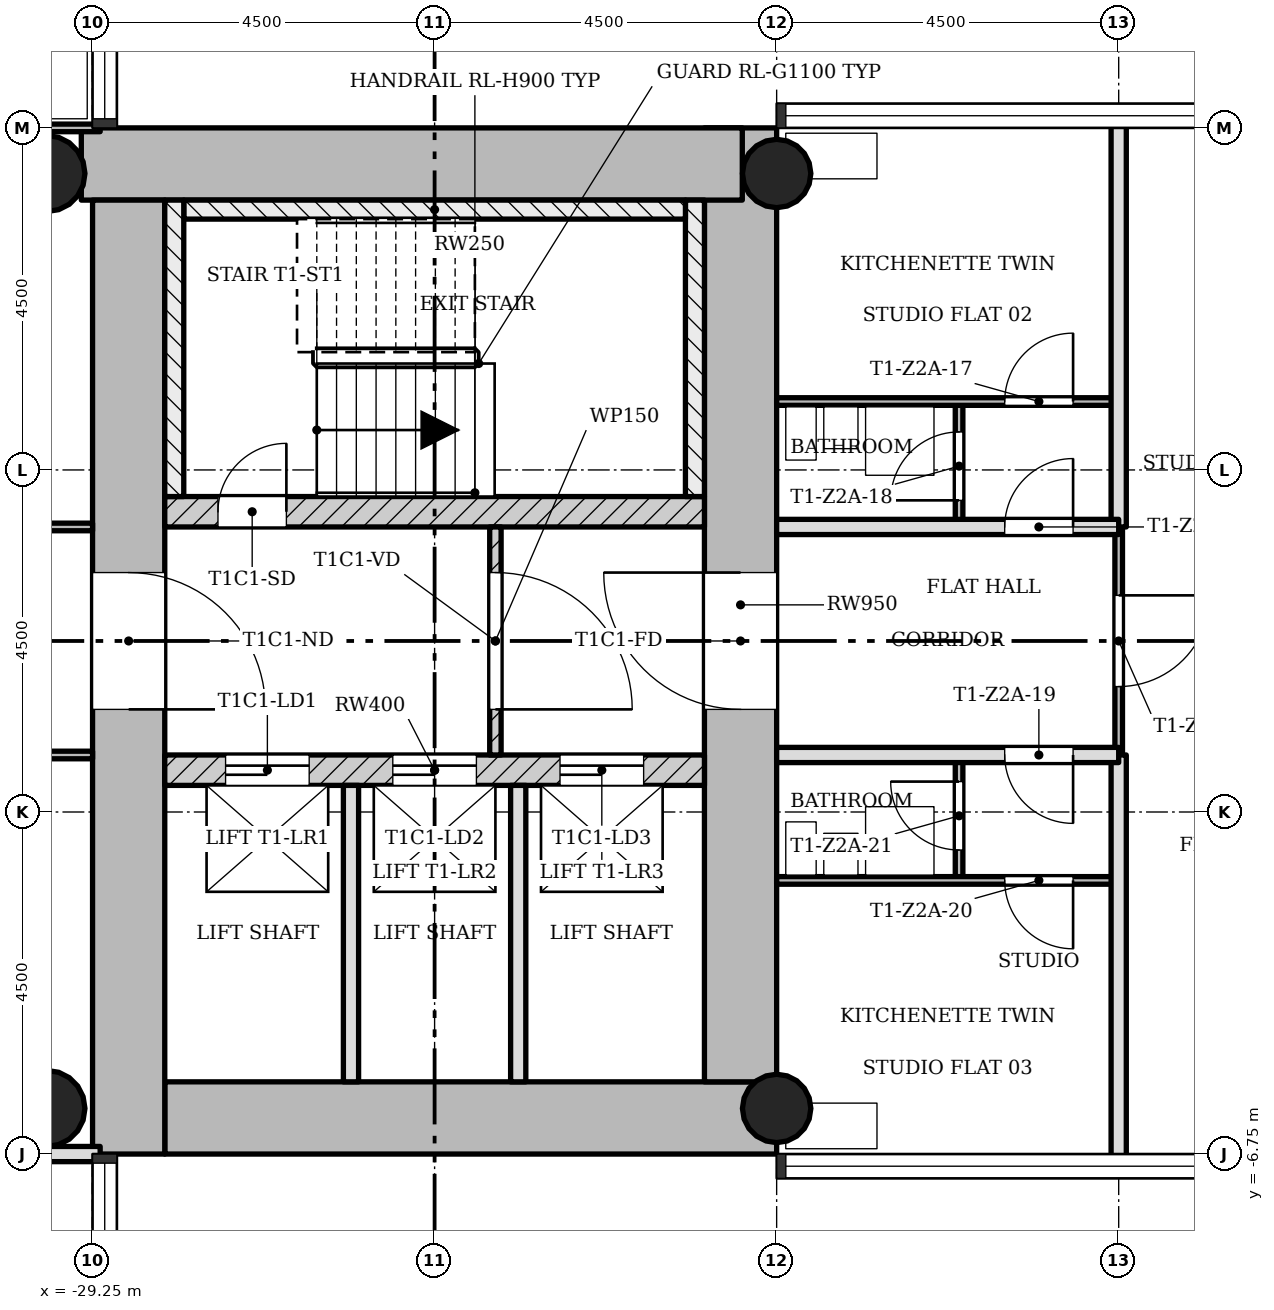
"""IFC4 building model, lengths in metres.
Left out: names, types, materials, properties, quantities, classifications, styles, units other than length and angle.
Written with IfcOpenShell. Run it as: python <this file> out.ifc"""

import sys

from ifc_helpers import new_model, si_unit, direction, frame, frame_2d, origin, origin_2d, place, context, subcontext, project, spatial, rectangle, hollow_circle, extrude, element, fill, save


model = new_model("IFC4")
c1 = context("Model", 3, precision=1e-05, world=origin(), true_north=direction((0.0, 1.0)))
c2 = subcontext(c1, "Body", "Model", "MODEL_VIEW")
j1 = project(units=[si_unit("LENGTHUNIT", "METRE"), si_unit("PLANEANGLEUNIT", "RADIAN")], contexts=[c1])
p1 = place(None, origin())
s1 = spatial("IfcSite", under=j1, at=p1, CompositionType="ELEMENT")
p2 = place(p1, origin())
s2 = spatial("IfcBuilding", under=s1, at=p2, CompositionType="ELEMENT")
p3 = place(p2, frame((0.0, 0.0, 117.4)))
s3 = spatial("IfcBuildingStorey", under=s2, at=p3, CompositionType="ELEMENT", Elevation=117.4)
p4 = place(p3, frame((-28.3, -6.275, 0.0), z_axis=(0.0, 0.0, 1.0), x_axis=(1.0, 0.0, 0.0)))
e1 = element("IfcWall", 1, at=p4, inside=s3, PredefinedType="SHEAR", context=c2, shape_type="SweptSolid", body=[
    extrude(rectangle(XDim=8.05, YDim=0.95, at=frame_2d((4.025, 0.0))), origin(), (0.0, 0.0, 1.0), 3.4),
])
p5 = place(p3, frame((-20.725, -5.8, 0.0), z_axis=(0.0, 0.0, 1.0), x_axis=(0.0, 1.0, 0.0)))
e2 = element("IfcWall", 2, at=p5, inside=s3, PredefinedType="SHEAR", context=c2, shape_type="SweptSolid", body=[
    extrude(rectangle(XDim=12.55, YDim=0.95, at=frame_2d((6.275, 0.0))), origin(), (0.0, 0.0, 1.0), 3.4),
])
p6 = place(p5, frame((4.9, 0.0, 0.0)))
e3 = element("IfcOpeningElement", 3, at=p6, cuts=e2, PredefinedType="OPENING", context=c2, shape_type="SweptSolid", body=[
    extrude(rectangle(XDim=1.8, YDim=2.1, at=frame_2d((0.9, 1.05))), frame((0.0, 0.485, 0.0), z_axis=(0.0, -1.0, 0.0), x_axis=(1.0, 0.0, 0.0)), (0.0, 0.0, 1.0), 0.97),
])
p7 = place(p3, frame((-20.702, 6.275, 0.0), z_axis=(0.0, 0.0, 1.0), x_axis=(-1.0, 0.0, 0.0)))
e4 = element("IfcWall", 4, at=p7, inside=s3, PredefinedType="SHEAR", context=c2, shape_type="SweptSolid", body=[
    extrude(rectangle(XDim=8.696, YDim=0.95, at=frame_2d((4.348, 0.0))), origin(), (0.0, 0.0, 1.0), 3.4),
])
p8 = place(p3, frame((-28.775, 5.8, 0.0), z_axis=(0.0, 0.0, 1.0), x_axis=(0.0, -1.0, 0.0)))
e5 = element("IfcWall", 5, at=p8, inside=s3, PredefinedType="SHEAR", context=c2, shape_type="SweptSolid", body=[
    extrude(rectangle(XDim=12.55, YDim=0.95, at=frame_2d((6.275, 0.0))), origin(), (0.0, 0.0, 1.0), 3.4),
])
p9 = place(p8, frame((4.9, 0.0, 0.0)))
e6 = element("IfcOpeningElement", 6, at=p9, cuts=e5, PredefinedType="OPENING", context=c2, shape_type="SweptSolid", body=[
    extrude(rectangle(XDim=1.8, YDim=2.1, at=frame_2d((0.9, 1.05))), frame((0.0, 0.485, 0.0), z_axis=(0.0, -1.0, 0.0), x_axis=(1.0, 0.0, 0.0)), (0.0, 0.0, 1.0), 0.97),
])
p10 = place(p3, frame((-28.3, -1.7, 0.0), z_axis=(0.0, 0.0, 1.0), x_axis=(1.0, 0.0, 0.0)))
e7 = element("IfcWall", 7, at=p10, inside=s3, PredefinedType="SHEAR", context=c2, shape_type="SweptSolid", body=[
    extrude(rectangle(XDim=7.1, YDim=0.4, at=frame_2d((3.55, 0.0))), origin(), (0.0, 0.0, 1.0), 3.4),
])
p11 = place(p10, frame((0.8, 0.0, 0.0)))
e8 = element("IfcOpeningElement", 8, at=p11, cuts=e7, PredefinedType="OPENING", context=c2, shape_type="SweptSolid", body=[
    extrude(rectangle(XDim=1.1, YDim=2.1, at=frame_2d((0.55, 1.05))), frame((0.0, 0.21, 0.0), z_axis=(0.0, -1.0, 0.0), x_axis=(1.0, 0.0, 0.0)), (0.0, 0.0, 1.0), 0.42),
])
p12 = place(p10, frame((3.0, 0.0, 0.0)))
e9 = element("IfcOpeningElement", 9, at=p12, cuts=e7, PredefinedType="OPENING", context=c2, shape_type="SweptSolid", body=[
    extrude(rectangle(XDim=1.1, YDim=2.1, at=frame_2d((0.55, 1.05))), frame((0.0, 0.21, 0.0), z_axis=(0.0, -1.0, 0.0), x_axis=(1.0, 0.0, 0.0)), (0.0, 0.0, 1.0), 0.42),
])
p13 = place(p10, frame((5.2, 0.0, 0.0)))
e10 = element("IfcOpeningElement", 10, at=p13, cuts=e7, PredefinedType="OPENING", context=c2, shape_type="SweptSolid", body=[
    extrude(rectangle(XDim=1.1, YDim=2.1, at=frame_2d((0.55, 1.05))), frame((0.0, 0.21, 0.0), z_axis=(0.0, -1.0, 0.0), x_axis=(1.0, 0.0, 0.0)), (0.0, 0.0, 1.0), 0.42),
])
p14 = place(p3, frame((-28.3, 1.7, 0.0), z_axis=(0.0, 0.0, 1.0), x_axis=(1.0, 0.0, 0.0)))
e11 = element("IfcWall", 11, at=p14, inside=s3, PredefinedType="SHEAR", context=c2, shape_type="SweptSolid", body=[
    extrude(rectangle(XDim=7.1, YDim=0.4, at=frame_2d((3.55, 0.0))), origin(), (0.0, 0.0, 1.0), 3.4),
])
p15 = place(p14, frame((0.7, 0.0, 0.0)))
e12 = element("IfcOpeningElement", 12, at=p15, cuts=e11, PredefinedType="OPENING", context=c2, shape_type="SweptSolid", body=[
    extrude(rectangle(XDim=0.9, YDim=2.1, at=frame_2d((0.45, 1.05))), frame((0.0, 0.21, 0.0), z_axis=(0.0, -1.0, 0.0), x_axis=(1.0, 0.0, 0.0)), (0.0, 0.0, 1.0), 0.42),
])
for number, where, z_axis, x_axis in (
    (13, (-20.25, -6.15, 0.0), (0.0, 0.0, 1.0), (1.0, 0.0, 0.0)),
    (14, (-20.25, 6.15, 0.0), (0.0, 0.0, 1.0), (1.0, 0.0, 0.0)),
):
    element("IfcColumn", number, at=place(p3, frame(where, z_axis=z_axis, x_axis=x_axis)), inside=s3, PredefinedType="COLUMN", context=c2, shape_type="SweptSolid", body=[
        extrude(hollow_circle(Radius=0.45, WallThickness=0.032, at=origin_2d()), origin(), (0.0, 0.0, 1.0), 3.4),
    ])
for number, where, z_axis, x_axis in (
    (15, (-29.85, -6.15, 0.0), (0.0, 0.0, 1.0), (1.0, 0.0, 0.0)),
    (16, (-29.85, 6.15, 0.0), (0.0, 0.0, 1.0), (1.0, 0.0, 0.0)),
):
    element("IfcColumn", number, at=place(p3, frame(where, z_axis=z_axis, x_axis=x_axis)), inside=s3, PredefinedType="COLUMN", context=c2, shape_type="SweptSolid", body=[
        extrude(hollow_circle(Radius=0.5, WallThickness=0.036, at=origin_2d()), origin(), (0.0, 0.0, 1.0), 3.4),
    ])
p16 = place(p3, frame((-23.95, -1.5, 0.0), z_axis=(0.0, 0.0, 1.0), x_axis=(0.0, 1.0, 0.0)))
e17 = element("IfcWall", 17, at=p16, inside=s3, PredefinedType="PARTITIONING", context=c2, shape_type="SweptSolid", body=[
    extrude(rectangle(XDim=3.0, YDim=0.15, at=frame_2d((1.5, 0.0))), origin(), (0.0, 0.0, 1.0), 3.0),
])
p17 = place(p16, frame((0.6, 0.0, 0.0)))
e18 = element("IfcOpeningElement", 18, at=p17, cuts=e17, PredefinedType="OPENING", context=c2, shape_type="SweptSolid", body=[
    extrude(rectangle(XDim=1.8, YDim=2.1, at=frame_2d((0.9, 1.05))), frame((0.0, 0.085, 0.0), z_axis=(0.0, -1.0, 0.0), x_axis=(1.0, 0.0, 0.0)), (0.0, 0.0, 1.0), 0.17),
])
for number, where, z_axis, x_axis in (
    (19, (-25.85, -5.8, 0.0), (0.0, 0.0, 1.0), (0.0, 1.0, 0.0)),
    (20, (-23.65, -5.8, 0.0), (0.0, 0.0, 1.0), (0.0, 1.0, 0.0)),
):
    element("IfcWall", number, at=place(p3, frame(where, z_axis=z_axis, x_axis=x_axis)), inside=s3, PredefinedType="SOLIDWALL", context=c2, shape_type="SweptSolid", body=[
        extrude(rectangle(XDim=3.9, YDim=0.2, at=frame_2d((1.95, 0.0))), origin(), (0.0, 0.0, 1.0), 3.0),
    ])
p18 = place(p3, frame((-17.85, -3.15, 0.0), z_axis=(0.0, 0.0, 1.0), x_axis=(0.0, 1.0, 0.0)))
e21 = element("IfcWall", 21, at=p18, inside=s3, PredefinedType="PARTITIONING", context=c2, shape_type="SweptSolid", body=[
    extrude(rectangle(XDim=1.65, YDim=0.1, at=frame_2d((0.825, 0.0))), origin(), (0.0, 0.0, 1.0), 3.0),
])
p19 = place(p18, frame((0.4, 0.0, 0.0)))
e22 = element("IfcOpeningElement", 22, at=p19, cuts=e21, PredefinedType="OPENING", context=c2, shape_type="SweptSolid", body=[
    extrude(rectangle(XDim=0.9, YDim=2.1, at=frame_2d((0.45, 1.05))), frame((0.0, 0.06, 0.0), z_axis=(0.0, -1.0, 0.0), x_axis=(1.0, 0.0, 0.0)), (0.0, 0.0, 1.0), 0.12),
])
p20 = place(p3, frame((-17.85, 1.5, 0.0), z_axis=(0.0, 0.0, 1.0), x_axis=(0.0, 1.0, 0.0)))
e23 = element("IfcWall", 23, at=p20, inside=s3, PredefinedType="PARTITIONING", context=c2, shape_type="SweptSolid", body=[
    extrude(rectangle(XDim=1.65, YDim=0.1, at=frame_2d((0.825, 0.0))), origin(), (0.0, 0.0, 1.0), 3.0),
])
p21 = place(p20, frame((0.35, 0.0, 0.0)))
e24 = element("IfcOpeningElement", 24, at=p21, cuts=e23, PredefinedType="OPENING", context=c2, shape_type="SweptSolid", body=[
    extrude(rectangle(XDim=0.9, YDim=2.1, at=frame_2d((0.45, 1.05))), frame((0.0, 0.06, 0.0), z_axis=(0.0, -1.0, 0.0), x_axis=(1.0, 0.0, 0.0)), (0.0, 0.0, 1.0), 0.12),
])
p22 = place(p3, frame((-15.75, -1.5, 0.0), z_axis=(0.0, 0.0, 1.0), x_axis=(0.0, 1.0, 0.0)))
e25 = element("IfcWall", 25, at=p22, inside=s3, PredefinedType="PARTITIONING", context=c2, shape_type="SweptSolid", body=[
    extrude(rectangle(XDim=3.0, YDim=0.1, at=frame_2d((1.5, 0.0))), origin(), (0.0, 0.0, 1.0), 3.0),
])
p23 = place(p22, frame((0.9, 0.0, 0.0)))
e26 = element("IfcOpeningElement", 26, at=p23, cuts=e25, PredefinedType="OPENING", context=c2, shape_type="SweptSolid", body=[
    extrude(rectangle(XDim=1.2, YDim=2.1, at=frame_2d((0.6, 1.05))), frame((0.0, 0.06, 0.0), z_axis=(0.0, -1.0, 0.0), x_axis=(1.0, 0.0, 0.0)), (0.0, 0.0, 1.0), 0.12),
])
for number, where, z_axis, x_axis in (
    (27, (-15.75, -6.85, 0.0), (0.0, 0.0, 1.0), (0.0, 1.0, 0.0)),
    (28, (-15.75, 1.5, 0.0), (0.0, 0.0, 1.0), (0.0, 1.0, 0.0)),
):
    element("IfcWall", number, at=place(p3, frame(where, z_axis=z_axis, x_axis=x_axis)), inside=s3, PredefinedType="SOLIDWALL", context=c2, shape_type="SweptSolid", body=[
        extrude(rectangle(XDim=5.35, YDim=0.2, at=frame_2d((2.675, 0.0))), origin(), (0.0, 0.0, 1.0), 3.0),
    ])
p24 = place(p3, frame((-35.1, -6.75, 0.0), z_axis=(0.0, 0.0, 1.0), x_axis=(1.0, 0.0, 0.0)))
e29 = element("IfcWall", 29, at=p24, inside=s3, PredefinedType="SOLIDWALL", context=c2, shape_type="SweptSolid", body=[
    extrude(rectangle(XDim=5.95, YDim=0.2, at=frame_2d((2.975, 0.0))), origin(), (0.0, 0.0, 1.0), 3.0),
])
p25 = place(p3, frame((-20.25, -3.15, 0.0), z_axis=(0.0, 0.0, 1.0), x_axis=(1.0, 0.0, 0.0)))
e30 = element("IfcWall", 30, at=p25, inside=s3, PredefinedType="PARTITIONING", context=c2, shape_type="SweptSolid", body=[
    extrude(rectangle(XDim=4.5, YDim=0.1, at=frame_2d((2.25, 0.0))), origin(), (0.0, 0.0, 1.0), 3.0),
])
p26 = place(p25, frame((3.0, 0.0, 0.0)))
e31 = element("IfcOpeningElement", 31, at=p26, cuts=e30, PredefinedType="OPENING", context=c2, shape_type="SweptSolid", body=[
    extrude(rectangle(XDim=0.9, YDim=2.1, at=frame_2d((0.45, 1.05))), frame((0.0, 0.06, 0.0), z_axis=(0.0, -1.0, 0.0), x_axis=(1.0, 0.0, 0.0)), (0.0, 0.0, 1.0), 0.12),
])
p27 = place(p3, frame((-35.1, -1.5, 0.0), z_axis=(0.0, 0.0, 1.0), x_axis=(1.0, 0.0, 0.0)))
e32 = element("IfcWall", 32, at=p27, inside=s3, PredefinedType="PARTITIONING", context=c2, shape_type="SweptSolid", body=[
    extrude(rectangle(XDim=5.85, YDim=0.1, at=frame_2d((2.925, 0.0))), origin(), (0.0, 0.0, 1.0), 3.0),
])
p28 = place(p27, frame((2.475, 0.0, 0.0)))
e33 = element("IfcOpeningElement", 33, at=p28, cuts=e32, PredefinedType="OPENING", context=c2, shape_type="SweptSolid", body=[
    extrude(rectangle(XDim=0.9, YDim=2.1, at=frame_2d((0.45, 1.05))), frame((0.0, 0.06, 0.0), z_axis=(0.0, -1.0, 0.0), x_axis=(1.0, 0.0, 0.0)), (0.0, 0.0, 1.0), 0.12),
])
p29 = place(p3, frame((-20.25, -1.5, 0.0), z_axis=(0.0, 0.0, 1.0), x_axis=(1.0, 0.0, 0.0)))
e34 = element("IfcWall", 34, at=p29, inside=s3, PredefinedType="SOLIDWALL", context=c2, shape_type="SweptSolid", body=[
    extrude(rectangle(XDim=4.5, YDim=0.2, at=frame_2d((2.25, 0.0))), origin(), (0.0, 0.0, 1.0), 3.0),
])
p30 = place(p29, frame((3.0, 0.0, 0.0)))
e35 = element("IfcOpeningElement", 35, at=p30, cuts=e34, PredefinedType="OPENING", context=c2, shape_type="SweptSolid", body=[
    extrude(rectangle(XDim=0.9, YDim=2.1, at=frame_2d((0.45, 1.05))), frame((0.0, 0.11, 0.0), z_axis=(0.0, -1.0, 0.0), x_axis=(1.0, 0.0, 0.0)), (0.0, 0.0, 1.0), 0.22),
])
p31 = place(p3, frame((-35.1, 1.5, 0.0), z_axis=(0.0, 0.0, 1.0), x_axis=(1.0, 0.0, 0.0)))
e36 = element("IfcWall", 36, at=p31, inside=s3, PredefinedType="PARTITIONING", context=c2, shape_type="SweptSolid", body=[
    extrude(rectangle(XDim=5.85, YDim=0.1, at=frame_2d((2.925, 0.0))), origin(), (0.0, 0.0, 1.0), 3.0),
])
p32 = place(p31, frame((3.675, 0.0, 0.0)))
e37 = element("IfcOpeningElement", 37, at=p32, cuts=e36, PredefinedType="OPENING", context=c2, shape_type="SweptSolid", body=[
    extrude(rectangle(XDim=0.9, YDim=2.1, at=frame_2d((0.45, 1.05))), frame((0.0, 0.06, 0.0), z_axis=(0.0, -1.0, 0.0), x_axis=(1.0, 0.0, 0.0)), (0.0, 0.0, 1.0), 0.12),
])
p33 = place(p3, frame((-20.25, 1.5, 0.0), z_axis=(0.0, 0.0, 1.0), x_axis=(1.0, 0.0, 0.0)))
e38 = element("IfcWall", 38, at=p33, inside=s3, PredefinedType="SOLIDWALL", context=c2, shape_type="SweptSolid", body=[
    extrude(rectangle(XDim=4.5, YDim=0.2, at=frame_2d((2.25, 0.0))), origin(), (0.0, 0.0, 1.0), 3.0),
])
p34 = place(p33, frame((3.0, 0.0, 0.0)))
e39 = element("IfcOpeningElement", 39, at=p34, cuts=e38, PredefinedType="OPENING", context=c2, shape_type="SweptSolid", body=[
    extrude(rectangle(XDim=0.9, YDim=2.1, at=frame_2d((0.45, 1.05))), frame((0.0, 0.11, 0.0), z_axis=(0.0, -1.0, 0.0), x_axis=(1.0, 0.0, 0.0)), (0.0, 0.0, 1.0), 0.22),
])
p35 = place(p3, frame((-20.25, 3.15, 0.0), z_axis=(0.0, 0.0, 1.0), x_axis=(1.0, 0.0, 0.0)))
e40 = element("IfcWall", 40, at=p35, inside=s3, PredefinedType="PARTITIONING", context=c2, shape_type="SweptSolid", body=[
    extrude(rectangle(XDim=4.5, YDim=0.1, at=frame_2d((2.25, 0.0))), origin(), (0.0, 0.0, 1.0), 3.0),
])
p36 = place(p35, frame((3.0, 0.0, 0.0)))
e41 = element("IfcOpeningElement", 41, at=p36, cuts=e40, PredefinedType="OPENING", context=c2, shape_type="SweptSolid", body=[
    extrude(rectangle(XDim=0.9, YDim=2.1, at=frame_2d((0.45, 1.05))), frame((0.0, 0.06, 0.0), z_axis=(0.0, -1.0, 0.0), x_axis=(1.0, 0.0, 0.0)), (0.0, 0.0, 1.0), 0.12),
])
p37 = place(p3, frame((-35.1, 6.75, 0.0), z_axis=(0.0, 0.0, 1.0), x_axis=(1.0, 0.0, 0.0)))
e42 = element("IfcWall", 42, at=p37, inside=s3, PredefinedType="PARTITIONING", context=c2, shape_type="SweptSolid", body=[
    extrude(rectangle(XDim=5.95, YDim=0.1, at=frame_2d((2.975, 0.0))), origin(), (0.0, 0.0, 1.0), 3.0),
])
p38 = place(p3, frame((-21.325, 1.9, 0.0), z_axis=(0.0, 0.0, 1.0), x_axis=(0.0, 1.0, 0.0)))
e43 = element("IfcWall", 43, at=p38, inside=s3, PredefinedType="SHEAR", context=c2, shape_type="SweptSolid", body=[
    extrude(rectangle(XDim=3.9, YDim=0.25, at=frame_2d((1.95, 0.0))), origin(), (0.0, 0.0, 1.0), 3.4),
])
p39 = place(p3, frame((-28.05, 5.675, 0.0), z_axis=(0.0, 0.0, 1.0), x_axis=(1.0, 0.0, 0.0)))
e44 = element("IfcWall", 44, at=p39, inside=s3, PredefinedType="SHEAR", context=c2, shape_type="SweptSolid", body=[
    extrude(rectangle(XDim=6.6, YDim=0.25, at=frame_2d((3.3, 0.0))), origin(), (0.0, 0.0, 1.0), 3.4),
])
p40 = place(p3, frame((-28.175, 1.9, 0.0), z_axis=(0.0, 0.0, 1.0), x_axis=(0.0, 1.0, 0.0)))
e45 = element("IfcWall", 45, at=p40, inside=s3, PredefinedType="SHEAR", context=c2, shape_type="SweptSolid", body=[
    extrude(rectangle(XDim=3.9, YDim=0.25, at=frame_2d((1.95, 0.0))), origin(), (0.0, 0.0, 1.0), 3.4),
])
p41 = place(p17, origin())
e46 = element("IfcDoor", 46, at=p41, inside=s3, OperationType="SINGLE_SWING_LEFT", PredefinedType="DOOR", context=c2, shape_type="SweptSolid", body=[
    extrude(rectangle(XDim=1.8, YDim=2.1, at=frame_2d((0.9, 1.05))), frame((0.0, 0.025, 0.0), z_axis=(0.0, -1.0, 0.0), x_axis=(1.0, 0.0, 0.0)), (0.0, 0.0, 1.0), 0.05),
])
fill(e18, e46)
p42 = place(p34, origin())
e47 = element("IfcDoor", 47, at=p42, inside=s3, OperationType="SINGLE_SWING_LEFT", PredefinedType="DOOR", context=c2, shape_type="SweptSolid", body=[
    extrude(rectangle(XDim=0.9, YDim=2.1, at=frame_2d((0.45, 1.05))), frame((0.0, 0.025, 0.0), z_axis=(0.0, -1.0, 0.0), x_axis=(1.0, 0.0, 0.0)), (0.0, 0.0, 1.0), 0.05),
])
fill(e39, e47)
p43 = place(p36, origin())
e48 = element("IfcDoor", 48, at=p43, inside=s3, OperationType="SINGLE_SWING_LEFT", PredefinedType="DOOR", context=c2, shape_type="SweptSolid", body=[
    extrude(rectangle(XDim=0.9, YDim=2.1, at=frame_2d((0.45, 1.05))), frame((0.0, 0.025, 0.0), z_axis=(0.0, -1.0, 0.0), x_axis=(1.0, 0.0, 0.0)), (0.0, 0.0, 1.0), 0.05),
])
fill(e41, e48)
p44 = place(p21, origin())
e49 = element("IfcDoor", 49, at=p44, inside=s3, OperationType="SINGLE_SWING_RIGHT", PredefinedType="DOOR", context=c2, shape_type="SweptSolid", body=[
    extrude(rectangle(XDim=0.9, YDim=2.1, at=frame_2d((0.45, 1.05))), frame((0.0, 0.025, 0.0), z_axis=(0.0, -1.0, 0.0), x_axis=(1.0, 0.0, 0.0)), (0.0, 0.0, 1.0), 0.05),
])
fill(e24, e49)
p45 = place(p30, origin())
e50 = element("IfcDoor", 50, at=p45, inside=s3, OperationType="SINGLE_SWING_RIGHT", PredefinedType="DOOR", context=c2, shape_type="SweptSolid", body=[
    extrude(rectangle(XDim=0.9, YDim=2.1, at=frame_2d((0.45, 1.05))), frame((0.0, 0.025, 0.0), z_axis=(0.0, -1.0, 0.0), x_axis=(1.0, 0.0, 0.0)), (0.0, 0.0, 1.0), 0.05),
])
fill(e35, e50)
p46 = place(p26, origin())
e51 = element("IfcDoor", 51, at=p46, inside=s3, OperationType="SINGLE_SWING_RIGHT", PredefinedType="DOOR", context=c2, shape_type="SweptSolid", body=[
    extrude(rectangle(XDim=0.9, YDim=2.1, at=frame_2d((0.45, 1.05))), frame((0.0, 0.025, 0.0), z_axis=(0.0, -1.0, 0.0), x_axis=(1.0, 0.0, 0.0)), (0.0, 0.0, 1.0), 0.05),
])
fill(e31, e51)
p47 = place(p19, origin())
e52 = element("IfcDoor", 52, at=p47, inside=s3, OperationType="SINGLE_SWING_LEFT", PredefinedType="DOOR", context=c2, shape_type="SweptSolid", body=[
    extrude(rectangle(XDim=0.9, YDim=2.1, at=frame_2d((0.45, 1.05))), frame((0.0, 0.025, 0.0), z_axis=(0.0, -1.0, 0.0), x_axis=(1.0, 0.0, 0.0)), (0.0, 0.0, 1.0), 0.05),
])
fill(e22, e52)
p48 = place(p23, origin())
e53 = element("IfcDoor", 53, at=p48, inside=s3, OperationType="SINGLE_SWING_RIGHT", PredefinedType="DOOR", context=c2, shape_type="SweptSolid", body=[
    extrude(rectangle(XDim=1.2, YDim=2.1, at=frame_2d((0.6, 1.05))), frame((0.0, 0.025, 0.0), z_axis=(0.0, -1.0, 0.0), x_axis=(1.0, 0.0, 0.0)), (0.0, 0.0, 1.0), 0.05),
])
fill(e26, e53)
p49 = place(p15, origin())
e54 = element("IfcDoor", 54, at=p49, inside=s3, OperationType="SINGLE_SWING_LEFT", PredefinedType="DOOR", context=c2, shape_type="SweptSolid", body=[
    extrude(rectangle(XDim=0.9, YDim=2.1, at=frame_2d((0.45, 1.05))), frame((0.0, 0.025, 0.0), z_axis=(0.0, -1.0, 0.0), x_axis=(1.0, 0.0, 0.0)), (0.0, 0.0, 1.0), 0.05),
])
fill(e12, e54)
p50 = place(p11, origin())
e55 = element("IfcDoor", 55, at=p50, inside=s3, OperationType="SLIDING_TO_LEFT", PredefinedType="DOOR", context=c2, shape_type="SweptSolid", body=[
    extrude(rectangle(XDim=1.1, YDim=2.1, at=frame_2d((0.55, 1.05))), frame((0.0, 0.025, 0.0), z_axis=(0.0, -1.0, 0.0), x_axis=(1.0, 0.0, 0.0)), (0.0, 0.0, 1.0), 0.05),
])
fill(e8, e55)
p51 = place(p12, origin())
e56 = element("IfcDoor", 56, at=p51, inside=s3, OperationType="SLIDING_TO_LEFT", PredefinedType="DOOR", context=c2, shape_type="SweptSolid", body=[
    extrude(rectangle(XDim=1.1, YDim=2.1, at=frame_2d((0.55, 1.05))), frame((0.0, 0.025, 0.0), z_axis=(0.0, -1.0, 0.0), x_axis=(1.0, 0.0, 0.0)), (0.0, 0.0, 1.0), 0.05),
])
fill(e9, e56)
p52 = place(p13, origin())
e57 = element("IfcDoor", 57, at=p52, inside=s3, OperationType="SLIDING_TO_LEFT", PredefinedType="DOOR", context=c2, shape_type="SweptSolid", body=[
    extrude(rectangle(XDim=1.1, YDim=2.1, at=frame_2d((0.55, 1.05))), frame((0.0, 0.025, 0.0), z_axis=(0.0, -1.0, 0.0), x_axis=(1.0, 0.0, 0.0)), (0.0, 0.0, 1.0), 0.05),
])
fill(e10, e57)
p53 = place(p9, origin())
e58 = element("IfcDoor", 58, at=p53, inside=s3, OperationType="SINGLE_SWING_LEFT", PredefinedType="DOOR", context=c2, shape_type="SweptSolid", body=[
    extrude(rectangle(XDim=1.8, YDim=2.1, at=frame_2d((0.9, 1.05))), frame((0.0, 0.025, 0.0), z_axis=(0.0, -1.0, 0.0), x_axis=(1.0, 0.0, 0.0)), (0.0, 0.0, 1.0), 0.05),
])
fill(e6, e58)
p54 = place(p6, origin())
e59 = element("IfcDoor", 59, at=p54, inside=s3, OperationType="SINGLE_SWING_LEFT", PredefinedType="DOOR", context=c2, shape_type="SweptSolid", body=[
    extrude(rectangle(XDim=1.8, YDim=2.1, at=frame_2d((0.9, 1.05))), frame((0.0, 0.025, 0.0), z_axis=(0.0, -1.0, 0.0), x_axis=(1.0, 0.0, 0.0)), (0.0, 0.0, 1.0), 0.05),
])
fill(e3, e59)
save(model, sys.argv[1])
